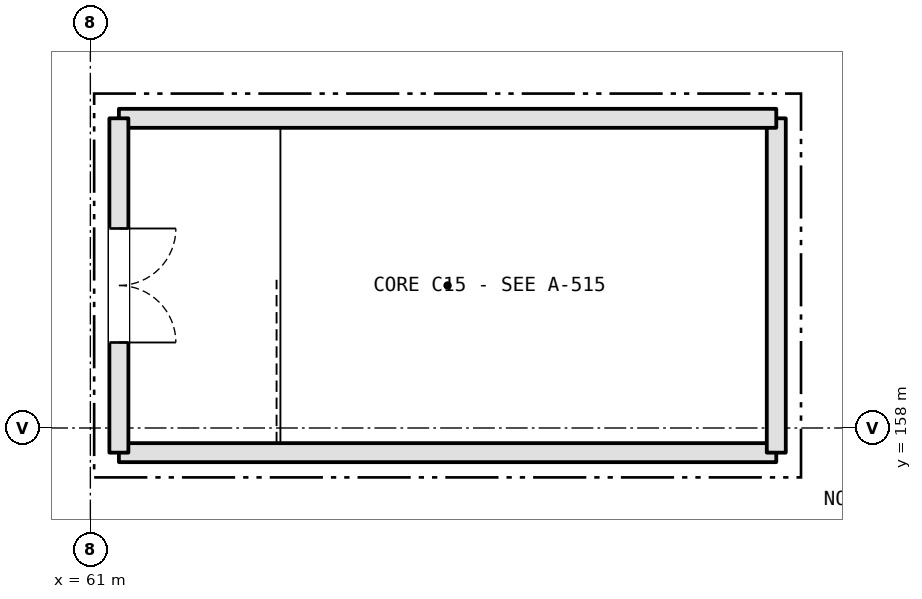
"""IFC4 building model, lengths in metres.
Left out: names, types, materials, properties, quantities, classifications, styles, units other than length and angle.
Written with IfcOpenShell. Run it as: python <this file> out.ifc"""

import sys

from ifc_helpers import new_model, si_unit, direction, frame, frame_2d, origin, place, context, subcontext, project, spatial, rectangle, extrude, element, fill, save


model = new_model("IFC4")
c1 = context("Model", 3, precision=1e-05, world=origin(), true_north=direction((0.0, 1.0)))
c2 = subcontext(c1, "Body", "Model", "MODEL_VIEW")
j1 = project(units=[si_unit("LENGTHUNIT", "METRE"), si_unit("PLANEANGLEUNIT", "RADIAN")], contexts=[c1])
p1 = place(None, origin())
s1 = spatial("IfcSite", under=j1, at=p1, CompositionType="ELEMENT")
p2 = place(p1, origin())
s2 = spatial("IfcBuilding", under=s1, at=p2, CompositionType="ELEMENT")
p3 = place(p2, frame((0.0, 0.0, 16.2)))
s3 = spatial("IfcBuildingStorey", under=s2, at=p3, CompositionType="ELEMENT", Elevation=16.2)
p4 = place(p3, frame((61.375, 157.675, 0.0), z_axis=(0.0, 0.0, 1.0), x_axis=(1.0, 0.0, 0.0)))
e1 = element("IfcWall", 1, at=p4, inside=s3, PredefinedType="SHEAR", context=c2, shape_type="SweptSolid", body=[
    extrude(rectangle(XDim=8.649, YDim=0.25, at=frame_2d((4.325, 0.0))), origin(), (0.0, 0.0, 1.0), 5.14),
])
p5 = place(p3, frame((70.025, 157.675, 0.0), z_axis=(0.0, 0.0, 1.0), x_axis=(0.0, 1.0, 0.0)))
e2 = element("IfcWall", 2, at=p5, inside=s3, PredefinedType="SHEAR", context=c2, shape_type="SweptSolid", body=[
    extrude(rectangle(XDim=4.399, YDim=0.25, at=frame_2d((2.2, 0.0))), origin(), (0.0, 0.0, 1.0), 5.14),
])
p6 = place(p3, frame((70.025, 162.075, 0.0), z_axis=(0.0, 0.0, 1.0), x_axis=(-1.0, 0.0, 0.0)))
e3 = element("IfcWall", 3, at=p6, inside=s3, PredefinedType="SHEAR", context=c2, shape_type="SweptSolid", body=[
    extrude(rectangle(XDim=8.649, YDim=0.25, at=frame_2d((4.325, 0.0))), origin(), (0.0, 0.0, 1.0), 5.14),
])
p7 = place(p3, frame((61.375, 162.075, 0.0), z_axis=(0.0, 0.0, 1.0), x_axis=(0.0, -1.0, 0.0)))
e4 = element("IfcWall", 4, at=p7, inside=s3, PredefinedType="SHEAR", context=c2, shape_type="SweptSolid", body=[
    extrude(rectangle(XDim=4.399, YDim=0.25, at=frame_2d((2.2, 0.0))), origin(), (0.0, 0.0, 1.0), 5.14),
])
p8 = place(p7, frame((1.45, 0.0, 0.0)))
e5 = element("IfcOpeningElement", 5, at=p8, cuts=e4, PredefinedType="OPENING", context=c2, shape_type="SweptSolid", body=[
    extrude(rectangle(XDim=1.5, YDim=2.2, at=frame_2d((0.75, 1.1))), frame((0.0, 0.135, 0.0), z_axis=(0.0, -1.0, 0.0), x_axis=(1.0, 0.0, 0.0)), (0.0, 0.0, 1.0), 0.27),
])
p9 = place(p8, origin())
e6 = element("IfcDoor", 6, at=p9, inside=s3, OperationType="DOUBLE_DOOR_SINGLE_SWING", PredefinedType="DOOR", context=c2, shape_type="SweptSolid", body=[
    extrude(rectangle(XDim=1.5, YDim=2.2, at=frame_2d((0.75, 1.1))), frame((0.0, 0.025, 0.0), z_axis=(0.0, -1.0, 0.0), x_axis=(1.0, 0.0, 0.0)), (0.0, 0.0, 1.0), 0.05),
])
fill(e5, e6)
save(model, sys.argv[1])
